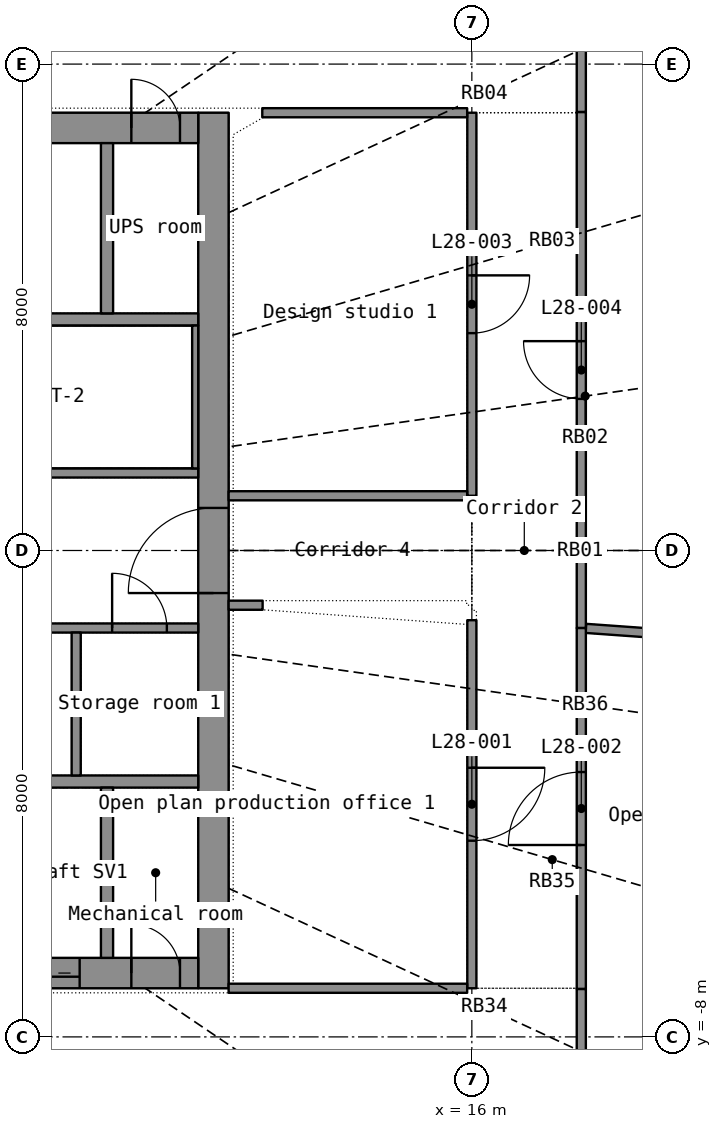
"""IFC4 building model, lengths in metres.
Left out: names, types, materials, properties, quantities, classifications, styles, units other than length and angle.
Written with IfcOpenShell. Run it as: python <this file> out.ifc"""

import sys

from ifc_helpers import new_model, si_unit, direction, frame, frame_2d, origin, place, context, subcontext, project, spatial, rectangle, extrude, element, fill, save


model = new_model("IFC4")
c1 = context("Model", 3, precision=1e-05, world=origin(), true_north=direction((0.0, 1.0)))
c2 = subcontext(c1, "Body", "Model", "MODEL_VIEW")
j1 = project(units=[si_unit("LENGTHUNIT", "METRE"), si_unit("PLANEANGLEUNIT", "RADIAN")], contexts=[c1])
p1 = place(None, origin())
s1 = spatial("IfcSite", under=j1, at=p1, CompositionType="ELEMENT")
p2 = place(p1, origin())
s2 = spatial("IfcBuilding", under=s1, at=p2, CompositionType="ELEMENT")
p3 = place(p2, frame((0.0, 0.0, 119.3)))
s3 = spatial("IfcBuildingStorey", under=s2, at=p3, CompositionType="ELEMENT", Elevation=119.3)
p4 = place(p3, frame((11.75, -7.2, 0.0), z_axis=(0.0, 0.0, 1.0), x_axis=(0.0, 1.0, 0.0)))
e1 = element("IfcWall", 1, at=p4, inside=s3, PredefinedType="SHEAR", context=c2, shape_type="SweptSolid", body=[
    extrude(rectangle(XDim=14.4, YDim=0.5, at=frame_2d((7.2, 0.0))), origin(), (0.0, 0.0, 1.0), 3.3),
])
p5 = place(p4, frame((6.5, 0.0, 0.0)))
e2 = element("IfcOpeningElement", 2, at=p5, cuts=e1, PredefinedType="OPENING", context=c2, shape_type="SweptSolid", body=[
    extrude(rectangle(XDim=1.4, YDim=2.2, at=frame_2d((0.7, 1.1))), frame((0.0, 0.26, 0.0), z_axis=(0.0, -1.0, 0.0), x_axis=(1.0, 0.0, 0.0)), (0.0, 0.0, 1.0), 0.52),
])
p6 = place(p3, frame((-11.5, -6.95, 0.0), z_axis=(0.0, 0.0, 1.0), x_axis=(1.0, 0.0, 0.0)))
e3 = element("IfcWall", 3, at=p6, inside=s3, PredefinedType="SHEAR", context=c2, shape_type="SweptSolid", body=[
    extrude(rectangle(XDim=23.0, YDim=0.5, at=frame_2d((11.5, 0.0))), origin(), (0.0, 0.0, 1.0), 3.3),
])
p7 = place(p6, frame((1.95, 0.0, 0.0)))
e4 = element("IfcOpeningElement", 4, at=p7, cuts=e3, PredefinedType="OPENING", context=c2, shape_type="SweptSolid", body=[
    extrude(rectangle(XDim=1.1, YDim=2.2, at=frame_2d((0.55, 1.1))), frame((0.0, 0.26, 0.0), z_axis=(0.0, -1.0, 0.0), x_axis=(1.0, 0.0, 0.0)), (0.0, 0.0, 1.0), 0.52),
])
p8 = place(p6, frame((3.95, 0.0, 0.0)))
e5 = element("IfcOpeningElement", 5, at=p8, cuts=e3, PredefinedType="OPENING", context=c2, shape_type="SweptSolid", body=[
    extrude(rectangle(XDim=1.1, YDim=2.2, at=frame_2d((0.55, 1.1))), frame((0.0, 0.26, 0.0), z_axis=(0.0, -1.0, 0.0), x_axis=(1.0, 0.0, 0.0)), (0.0, 0.0, 1.0), 0.52),
])
p9 = place(p6, frame((5.95, 0.0, 0.0)))
e6 = element("IfcOpeningElement", 6, at=p9, cuts=e3, PredefinedType="OPENING", context=c2, shape_type="SweptSolid", body=[
    extrude(rectangle(XDim=1.1, YDim=2.2, at=frame_2d((0.55, 1.1))), frame((0.0, 0.26, 0.0), z_axis=(0.0, -1.0, 0.0), x_axis=(1.0, 0.0, 0.0)), (0.0, 0.0, 1.0), 0.52),
])
p10 = place(p6, frame((7.95, 0.0, 0.0)))
e7 = element("IfcOpeningElement", 7, at=p10, cuts=e3, PredefinedType="OPENING", context=c2, shape_type="SweptSolid", body=[
    extrude(rectangle(XDim=1.1, YDim=2.2, at=frame_2d((0.55, 1.1))), frame((0.0, 0.26, 0.0), z_axis=(0.0, -1.0, 0.0), x_axis=(1.0, 0.0, 0.0)), (0.0, 0.0, 1.0), 0.52),
])
p11 = place(p6, frame((9.95, 0.0, 0.0)))
e8 = element("IfcOpeningElement", 8, at=p11, cuts=e3, PredefinedType="OPENING", context=c2, shape_type="SweptSolid", body=[
    extrude(rectangle(XDim=1.1, YDim=2.2, at=frame_2d((0.55, 1.1))), frame((0.0, 0.26, 0.0), z_axis=(0.0, -1.0, 0.0), x_axis=(1.0, 0.0, 0.0)), (0.0, 0.0, 1.0), 0.52),
])
p12 = place(p6, frame((11.95, 0.0, 0.0)))
e9 = element("IfcOpeningElement", 9, at=p12, cuts=e3, PredefinedType="OPENING", context=c2, shape_type="SweptSolid", body=[
    extrude(rectangle(XDim=1.1, YDim=2.2, at=frame_2d((0.55, 1.1))), frame((0.0, 0.26, 0.0), z_axis=(0.0, -1.0, 0.0), x_axis=(1.0, 0.0, 0.0)), (0.0, 0.0, 1.0), 0.52),
])
p13 = place(p6, frame((13.95, 0.0, 0.0)))
e10 = element("IfcOpeningElement", 10, at=p13, cuts=e3, PredefinedType="OPENING", context=c2, shape_type="SweptSolid", body=[
    extrude(rectangle(XDim=1.1, YDim=2.2, at=frame_2d((0.55, 1.1))), frame((0.0, 0.26, 0.0), z_axis=(0.0, -1.0, 0.0), x_axis=(1.0, 0.0, 0.0)), (0.0, 0.0, 1.0), 0.52),
])
p14 = place(p6, frame((15.95, 0.0, 0.0)))
e11 = element("IfcOpeningElement", 11, at=p14, cuts=e3, PredefinedType="OPENING", context=c2, shape_type="SweptSolid", body=[
    extrude(rectangle(XDim=1.1, YDim=2.2, at=frame_2d((0.55, 1.1))), frame((0.0, 0.26, 0.0), z_axis=(0.0, -1.0, 0.0), x_axis=(1.0, 0.0, 0.0)), (0.0, 0.0, 1.0), 0.52),
])
p15 = place(p6, frame((19.95, 0.0, 0.0)))
e12 = element("IfcOpeningElement", 12, at=p15, cuts=e3, PredefinedType="OPENING", context=c2, shape_type="SweptSolid", body=[
    extrude(rectangle(XDim=1.1, YDim=2.2, at=frame_2d((0.55, 1.1))), frame((0.0, 0.26, 0.0), z_axis=(0.0, -1.0, 0.0), x_axis=(1.0, 0.0, 0.0)), (0.0, 0.0, 1.0), 0.52),
])
p16 = place(p6, frame((0.3, 0.0, 0.0)))
e13 = element("IfcOpeningElement", 13, at=p16, cuts=e3, PredefinedType="OPENING", context=c2, shape_type="SweptSolid", body=[
    extrude(rectangle(XDim=0.8, YDim=2.05, at=frame_2d((0.4, 1.025))), frame((0.0, 0.26, 0.0), z_axis=(0.0, -1.0, 0.0), x_axis=(1.0, 0.0, 0.0)), (0.0, 0.0, 1.0), 0.52),
])
p17 = place(p6, frame((21.9, 0.0, 0.0)))
e14 = element("IfcOpeningElement", 14, at=p17, cuts=e3, PredefinedType="OPENING", context=c2, shape_type="SweptSolid", body=[
    extrude(rectangle(XDim=0.8, YDim=2.05, at=frame_2d((0.4, 1.025))), frame((0.0, 0.26, 0.0), z_axis=(0.0, -1.0, 0.0), x_axis=(1.0, 0.0, 0.0)), (0.0, 0.0, 1.0), 0.52),
])
p18 = place(p3, frame((-11.5, 6.95, 0.0), z_axis=(0.0, 0.0, 1.0), x_axis=(1.0, 0.0, 0.0)))
e15 = element("IfcWall", 15, at=p18, inside=s3, PredefinedType="SHEAR", context=c2, shape_type="SweptSolid", body=[
    extrude(rectangle(XDim=23.0, YDim=0.5, at=frame_2d((11.5, 0.0))), origin(), (0.0, 0.0, 1.0), 3.3),
])
p19 = place(p18, frame((1.95, 0.0, 0.0)))
e16 = element("IfcOpeningElement", 16, at=p19, cuts=e15, PredefinedType="OPENING", context=c2, shape_type="SweptSolid", body=[
    extrude(rectangle(XDim=1.1, YDim=2.2, at=frame_2d((0.55, 1.1))), frame((0.0, 0.26, 0.0), z_axis=(0.0, -1.0, 0.0), x_axis=(1.0, 0.0, 0.0)), (0.0, 0.0, 1.0), 0.52),
])
p20 = place(p18, frame((7.05, 0.0, 0.0)))
e17 = element("IfcOpeningElement", 17, at=p20, cuts=e15, PredefinedType="OPENING", context=c2, shape_type="SweptSolid", body=[
    extrude(rectangle(XDim=0.9, YDim=2.1, at=frame_2d((0.45, 1.05))), frame((0.0, 0.26, 0.0), z_axis=(0.0, -1.0, 0.0), x_axis=(1.0, 0.0, 0.0)), (0.0, 0.0, 1.0), 0.52),
])
p21 = place(p18, frame((12.05, 0.0, 0.0)))
e18 = element("IfcOpeningElement", 18, at=p21, cuts=e15, PredefinedType="OPENING", context=c2, shape_type="SweptSolid", body=[
    extrude(rectangle(XDim=0.9, YDim=2.1, at=frame_2d((0.45, 1.05))), frame((0.0, 0.26, 0.0), z_axis=(0.0, -1.0, 0.0), x_axis=(1.0, 0.0, 0.0)), (0.0, 0.0, 1.0), 0.52),
])
p22 = place(p18, frame((18.05, 0.0, 0.0)))
e19 = element("IfcOpeningElement", 19, at=p22, cuts=e15, PredefinedType="OPENING", context=c2, shape_type="SweptSolid", body=[
    extrude(rectangle(XDim=0.9, YDim=2.1, at=frame_2d((0.45, 1.05))), frame((0.0, 0.26, 0.0), z_axis=(0.0, -1.0, 0.0), x_axis=(1.0, 0.0, 0.0)), (0.0, 0.0, 1.0), 0.52),
])
p23 = place(p18, frame((0.3, 0.0, 0.0)))
e20 = element("IfcOpeningElement", 20, at=p23, cuts=e15, PredefinedType="OPENING", context=c2, shape_type="SweptSolid", body=[
    extrude(rectangle(XDim=0.8, YDim=2.05, at=frame_2d((0.4, 1.025))), frame((0.0, 0.26, 0.0), z_axis=(0.0, -1.0, 0.0), x_axis=(1.0, 0.0, 0.0)), (0.0, 0.0, 1.0), 0.52),
])
p24 = place(p18, frame((21.9, 0.0, 0.0)))
e21 = element("IfcOpeningElement", 21, at=p24, cuts=e15, PredefinedType="OPENING", context=c2, shape_type="SweptSolid", body=[
    extrude(rectangle(XDim=0.8, YDim=2.05, at=frame_2d((0.4, 1.025))), frame((0.0, 0.26, 0.0), z_axis=(0.0, -1.0, 0.0), x_axis=(1.0, 0.0, 0.0)), (0.0, 0.0, 1.0), 0.52),
])
for number, where, z_axis, x_axis in (
    (22, (-11.5, -3.8, 0.0), (0.0, 0.0, 1.0), (1.0, 0.0, 0.0)),
    (23, (-11.5, 3.8, 0.0), (0.0, 0.0, 1.0), (1.0, 0.0, 0.0)),
):
    element("IfcWall", number, at=place(p3, frame(where, z_axis=z_axis, x_axis=x_axis)), inside=s3, PredefinedType="SHEAR", context=c2, shape_type="SweptSolid", body=[
        extrude(rectangle(XDim=23.0, YDim=0.2, at=frame_2d((11.5, 0.0))), origin(), (0.0, 0.0, 1.0), 3.3),
    ])
for number, where, z_axis, x_axis in (
    (24, (10.0, -6.7, 0.0), (0.0, 0.0, 1.0), (0.0, 1.0, 0.0)),
    (25, (10.0, 3.9, 0.0), (0.0, 0.0, 1.0), (0.0, 1.0, 0.0)),
):
    element("IfcWall", number, at=place(p3, frame(where, z_axis=z_axis, x_axis=x_axis)), inside=s3, PredefinedType="SHEAR", context=c2, shape_type="SweptSolid", body=[
        extrude(rectangle(XDim=2.8, YDim=0.2, at=frame_2d((1.4, 0.0))), origin(), (0.0, 0.0, 1.0), 3.3),
    ])
p25 = place(p3, frame((3.0, -1.275, 0.0), z_axis=(0.0, 0.0, 1.0), x_axis=(1.0, 0.0, 0.0)))
e26 = element("IfcWall", 26, at=p25, inside=s3, PredefinedType="PARTITIONING", context=c2, shape_type="SweptSolid", body=[
    extrude(rectangle(XDim=8.5, YDim=0.15, at=frame_2d((4.25, 0.0))), origin(), (0.0, 0.0, 1.0), 3.3),
])
p26 = place(p25, frame((0.622, 0.0, 0.0)))
e27 = element("IfcOpeningElement", 27, at=p26, cuts=e26, PredefinedType="OPENING", context=c2, shape_type="SweptSolid", body=[
    extrude(rectangle(XDim=0.85, YDim=2.1, at=frame_2d((0.425, 1.05))), frame((0.0, 0.085, 0.0), z_axis=(0.0, -1.0, 0.0), x_axis=(1.0, 0.0, 0.0)), (0.0, 0.0, 1.0), 0.17),
])
p27 = place(p25, frame((2.865, 0.0, 0.0)))
e28 = element("IfcOpeningElement", 28, at=p27, cuts=e26, PredefinedType="OPENING", context=c2, shape_type="SweptSolid", body=[
    extrude(rectangle(XDim=0.85, YDim=2.1, at=frame_2d((0.425, 1.05))), frame((0.0, 0.085, 0.0), z_axis=(0.0, -1.0, 0.0), x_axis=(1.0, 0.0, 0.0)), (0.0, 0.0, 1.0), 0.17),
])
p28 = place(p25, frame((5.002, 0.0, 0.0)))
e29 = element("IfcOpeningElement", 29, at=p28, cuts=e26, PredefinedType="OPENING", context=c2, shape_type="SweptSolid", body=[
    extrude(rectangle(XDim=0.9, YDim=2.1, at=frame_2d((0.45, 1.05))), frame((0.0, 0.085, 0.0), z_axis=(0.0, -1.0, 0.0), x_axis=(1.0, 0.0, 0.0)), (0.0, 0.0, 1.0), 0.17),
])
p29 = place(p25, frame((7.084, 0.0, 0.0)))
e30 = element("IfcOpeningElement", 30, at=p29, cuts=e26, PredefinedType="OPENING", context=c2, shape_type="SweptSolid", body=[
    extrude(rectangle(XDim=0.9, YDim=2.1, at=frame_2d((0.45, 1.05))), frame((0.0, 0.085, 0.0), z_axis=(0.0, -1.0, 0.0), x_axis=(1.0, 0.0, 0.0)), (0.0, 0.0, 1.0), 0.17),
])
p30 = place(p3, frame((3.0, 1.275, 0.0), z_axis=(0.0, 0.0, 1.0), x_axis=(1.0, 0.0, 0.0)))
e31 = element("IfcWall", 31, at=p30, inside=s3, PredefinedType="SHEAR", context=c2, shape_type="SweptSolid", body=[
    extrude(rectangle(XDim=8.5, YDim=0.15, at=frame_2d((4.25, 0.0))), origin(), (0.0, 0.0, 1.0), 3.3),
])
p31 = place(p30, frame((2.05, 0.0, 0.0)))
e32 = element("IfcOpeningElement", 32, at=p31, cuts=e31, PredefinedType="OPENING", context=c2, shape_type="SweptSolid", body=[
    extrude(rectangle(XDim=1.1, YDim=2.15, at=frame_2d((0.55, 1.075))), frame((0.0, 0.085, 0.0), z_axis=(0.0, -1.0, 0.0), x_axis=(1.0, 0.0, 0.0)), (0.0, 0.0, 1.0), 0.17),
])
p32 = place(p30, frame((0.45, 0.0, 0.0)))
e33 = element("IfcOpeningElement", 33, at=p32, cuts=e31, PredefinedType="OPENING", context=c2, shape_type="SweptSolid", body=[
    extrude(rectangle(XDim=0.9, YDim=2.1, at=frame_2d((0.45, 1.05))), frame((0.0, 0.085, 0.0), z_axis=(0.0, -1.0, 0.0), x_axis=(1.0, 0.0, 0.0)), (0.0, 0.0, 1.0), 0.17),
])
p33 = place(p3, frame((11.45, 1.35, 0.0), z_axis=(0.0, 0.0, 1.0), x_axis=(0.0, 1.0, 0.0)))
e34 = element("IfcWall", 34, at=p33, inside=s3, PredefinedType="SHEAR", context=c2, shape_type="SweptSolid", body=[
    extrude(rectangle(XDim=2.35, YDim=0.1, at=frame_2d((1.175, 0.0))), origin(), (0.0, 0.0, 1.0), 3.3),
])
p34 = place(p3, frame((9.493, -3.7, 0.0), z_axis=(0.0, 0.0, 1.0), x_axis=(0.0, 1.0, 0.0)))
e35 = element("IfcWall", 35, at=p34, inside=s3, PredefinedType="PARTITIONING", context=c2, shape_type="SweptSolid", body=[
    extrude(rectangle(XDim=2.35, YDim=0.15, at=frame_2d((1.175, 0.0))), origin(), (0.0, 0.0, 1.0), 3.3),
])
p35 = place(p3, frame((17.8, -1.276, 0.0), z_axis=(0.0, 0.0, 1.0), x_axis=(0.0, 1.0, 0.0)))
e36 = element("IfcWall", 36, at=p35, inside=s3, PredefinedType="PARTITIONING", context=c2, shape_type="SweptSolid", body=[
    extrude(rectangle(XDim=8.488, YDim=0.15, at=frame_2d((4.244, 0.0))), origin(), (0.0, 0.0, 1.0), 2.4),
])
p36 = place(p35, frame((3.769, 0.0, 0.0)))
e37 = element("IfcOpeningElement", 37, at=p36, cuts=e36, PredefinedType="OPENING", context=c2, shape_type="SweptSolid", body=[
    extrude(rectangle(XDim=0.95, YDim=2.15, at=frame_2d((0.475, 1.075))), frame((0.0, 0.085, 0.0), z_axis=(0.0, -1.0, 0.0), x_axis=(1.0, 0.0, 0.0)), (0.0, 0.0, 1.0), 0.17),
])
p37 = place(p3, frame((25.006, -1.792, 0.0), z_axis=(0.0, 0.0, 1.0), x_axis=(-0.997440983, 0.071494657, 0.0)))
e38 = element("IfcWall", 38, at=p37, inside=s3, PredefinedType="PARTITIONING", context=c2, shape_type="SweptSolid", body=[
    extrude(rectangle(XDim=7.147, YDim=0.15, at=frame_2d((3.574, 0.0))), origin(), (0.0, 0.0, 1.0), 2.4),
])
p38 = place(p3, frame((16.0, 7.2, 0.0), z_axis=(0.0, 0.0, 1.0), x_axis=(0.0, -1.0, 0.0)))
e39 = element("IfcWall", 39, at=p38, inside=s3, PredefinedType="PARTITIONING", context=c2, shape_type="SweptSolid", body=[
    extrude(rectangle(XDim=6.3, YDim=0.15, at=frame_2d((3.15, 0.0))), origin(), (0.0, 0.0, 1.0), 2.4),
])
p39 = place(p38, frame((2.675, 0.0, 0.0)))
e40 = element("IfcOpeningElement", 40, at=p39, cuts=e39, PredefinedType="OPENING", context=c2, shape_type="SweptSolid", body=[
    extrude(rectangle(XDim=0.95, YDim=2.15, at=frame_2d((0.475, 1.075))), frame((0.0, 0.085, 0.0), z_axis=(0.0, -1.0, 0.0), x_axis=(1.0, 0.0, 0.0)), (0.0, 0.0, 1.0), 0.17),
])
p40 = place(p3, frame((16.0, -1.146, 0.0), z_axis=(0.0, 0.0, 1.0), x_axis=(0.0, -1.0, 0.0)))
e41 = element("IfcWall", 41, at=p40, inside=s3, PredefinedType="PARTITIONING", context=c2, shape_type="SweptSolid", body=[
    extrude(rectangle(XDim=6.053, YDim=0.15, at=frame_2d((3.027, 0.0))), origin(), (0.0, 0.0, 1.0), 2.4),
])
p41 = place(p40, frame((2.427, 0.0, 0.0)))
e42 = element("IfcOpeningElement", 42, at=p41, cuts=e41, PredefinedType="OPENING", context=c2, shape_type="SweptSolid", body=[
    extrude(rectangle(XDim=1.2, YDim=2.2, at=frame_2d((0.6, 1.1))), frame((0.0, 0.085, 0.0), z_axis=(0.0, -1.0, 0.0), x_axis=(1.0, 0.0, 0.0)), (0.0, 0.0, 1.0), 0.17),
])
p42 = place(p3, frame((17.8, -7.212, 0.0), z_axis=(0.0, 0.0, 1.0), x_axis=(0.0, 1.0, 0.0)))
e43 = element("IfcWall", 43, at=p42, inside=s3, PredefinedType="PARTITIONING", context=c2, shape_type="SweptSolid", body=[
    extrude(rectangle(XDim=5.936, YDim=0.15, at=frame_2d((2.968, 0.0))), origin(), (0.0, 0.0, 1.0), 2.4),
])
p43 = place(p42, frame((2.368, 0.0, 0.0)))
e44 = element("IfcOpeningElement", 44, at=p43, cuts=e43, PredefinedType="OPENING", context=c2, shape_type="SweptSolid", body=[
    extrude(rectangle(XDim=1.2, YDim=2.2, at=frame_2d((0.6, 1.1))), frame((0.0, 0.085, 0.0), z_axis=(0.0, -1.0, 0.0), x_axis=(1.0, 0.0, 0.0)), (0.0, 0.0, 1.0), 0.17),
])
for number, where, z_axis, x_axis in (
    (45, (15.923, -7.2, 0.0), (0.0, 0.0, 1.0), (-1.0, 0.0, 0.0)),
    (46, (15.923, 0.9, 0.0), (0.0, 0.0, 1.0), (-1.0, 0.0, 0.0)),
):
    element("IfcWall", number, at=place(p3, frame(where, z_axis=z_axis, x_axis=x_axis)), inside=s3, PredefinedType="PARTITIONING", context=c2, shape_type="SweptSolid", body=[
        extrude(rectangle(XDim=3.923, YDim=0.15, at=frame_2d((1.961, 0.0))), origin(), (0.0, 0.0, 1.0), 2.4),
    ])
p44 = place(p3, frame((17.8, -10.723, 0.0), z_axis=(0.0, 0.0, 1.0), x_axis=(0.0, 1.0, 0.0)))
e47 = element("IfcWall", 47, at=p44, inside=s3, PredefinedType="PARTITIONING", context=c2, shape_type="SweptSolid", body=[
    extrude(rectangle(XDim=3.51, YDim=0.15, at=frame_2d((1.755, 0.0))), origin(), (0.0, 0.0, 1.0), 2.4),
])
p45 = place(p3, frame((12.553, 7.2, 0.0), z_axis=(0.0, 0.0, 1.0), x_axis=(1.0, 0.0, 0.0)))
e48 = element("IfcWall", 48, at=p45, inside=s3, PredefinedType="PARTITIONING", context=c2, shape_type="SweptSolid", body=[
    extrude(rectangle(XDim=3.37, YDim=0.15, at=frame_2d((1.685, 0.0))), origin(), (0.0, 0.0, 1.0), 2.4),
])
p46 = place(p3, frame((17.8, 7.213, 0.0), z_axis=(0.0, 0.0, 1.0), x_axis=(0.0, 1.0, 0.0)))
e49 = element("IfcWall", 49, at=p46, inside=s3, PredefinedType="PARTITIONING", context=c2, shape_type="SweptSolid", body=[
    extrude(rectangle(XDim=2.387, YDim=0.15, at=frame_2d((1.194, 0.0))), origin(), (0.0, 0.0, 1.0), 2.4),
])
p47 = place(p3, frame((12.0, -0.9, 0.0), z_axis=(0.0, 0.0, 1.0), x_axis=(1.0, 0.0, 0.0)))
e50 = element("IfcWall", 50, at=p47, inside=s3, PredefinedType="PARTITIONING", context=c2, shape_type="SweptSolid", body=[
    extrude(rectangle(XDim=0.559, YDim=0.15, at=frame_2d((0.28, 0.0))), origin(), (0.0, 0.0, 1.0), 2.4),
])
p48 = place(p15, origin())
e51 = element("IfcDoor", 51, at=p48, inside=s3, OperationType="DOUBLE_DOOR_SLIDING", PredefinedType="DOOR", context=c2, shape_type="SweptSolid", body=[
    extrude(rectangle(XDim=1.1, YDim=2.2, at=frame_2d((0.55, 1.1))), frame((0.0, 0.025, 0.0), z_axis=(0.0, -1.0, 0.0), x_axis=(1.0, 0.0, 0.0)), (0.0, 0.0, 1.0), 0.05),
])
fill(e12, e51)
p49 = place(p17, origin())
e52 = element("IfcDoor", 52, at=p49, inside=s3, OperationType="SINGLE_SWING_LEFT", PredefinedType="DOOR", context=c2, shape_type="SweptSolid", body=[
    extrude(rectangle(XDim=0.8, YDim=2.05, at=frame_2d((0.4, 1.025))), frame((0.0, 0.025, 0.0), z_axis=(0.0, -1.0, 0.0), x_axis=(1.0, 0.0, 0.0)), (0.0, 0.0, 1.0), 0.05),
])
fill(e14, e52)
p50 = place(p24, origin())
e53 = element("IfcDoor", 53, at=p50, inside=s3, OperationType="SINGLE_SWING_LEFT", PredefinedType="DOOR", context=c2, shape_type="SweptSolid", body=[
    extrude(rectangle(XDim=0.8, YDim=2.05, at=frame_2d((0.4, 1.025))), frame((0.0, 0.025, 0.0), z_axis=(0.0, -1.0, 0.0), x_axis=(1.0, 0.0, 0.0)), (0.0, 0.0, 1.0), 0.05),
])
fill(e21, e53)
p51 = place(p5, origin())
e54 = element("IfcDoor", 54, at=p51, inside=s3, OperationType="DOUBLE_DOOR_SINGLE_SWING", PredefinedType="DOOR", context=c2, shape_type="SweptSolid", body=[
    extrude(rectangle(XDim=1.4, YDim=2.2, at=frame_2d((0.7, 1.1))), frame((0.0, 0.025, 0.0), z_axis=(0.0, -1.0, 0.0), x_axis=(1.0, 0.0, 0.0)), (0.0, 0.0, 1.0), 0.05),
])
fill(e2, e54)
p52 = place(p29, origin())
e55 = element("IfcDoor", 55, at=p52, inside=s3, OperationType="SINGLE_SWING_LEFT", PredefinedType="DOOR", context=c2, shape_type="SweptSolid", body=[
    extrude(rectangle(XDim=0.9, YDim=2.1, at=frame_2d((0.45, 1.05))), frame((0.0, 0.025, 0.0), z_axis=(0.0, -1.0, 0.0), x_axis=(1.0, 0.0, 0.0)), (0.0, 0.0, 1.0), 0.05),
])
fill(e30, e55)
p53 = place(p41, origin())
e56 = element("IfcDoor", 56, at=p53, inside=s3, OperationType="DOUBLE_DOOR_SINGLE_SWING", PredefinedType="DOOR", context=c2, shape_type="SweptSolid", body=[
    extrude(rectangle(XDim=1.2, YDim=2.2, at=frame_2d((0.6, 1.1))), frame((0.0, 0.025, 0.0), z_axis=(0.0, -1.0, 0.0), x_axis=(1.0, 0.0, 0.0)), (0.0, 0.0, 1.0), 0.05),
])
fill(e42, e56)
p54 = place(p43, origin())
e57 = element("IfcDoor", 57, at=p54, inside=s3, OperationType="DOUBLE_DOOR_SINGLE_SWING", PredefinedType="DOOR", context=c2, shape_type="SweptSolid", body=[
    extrude(rectangle(XDim=1.2, YDim=2.2, at=frame_2d((0.6, 1.1))), frame((0.0, 0.025, 0.0), z_axis=(0.0, -1.0, 0.0), x_axis=(1.0, 0.0, 0.0)), (0.0, 0.0, 1.0), 0.05),
])
fill(e44, e57)
p55 = place(p39, origin())
e58 = element("IfcDoor", 58, at=p55, inside=s3, OperationType="SINGLE_SWING_LEFT", PredefinedType="DOOR", context=c2, shape_type="SweptSolid", body=[
    extrude(rectangle(XDim=0.95, YDim=2.15, at=frame_2d((0.475, 1.075))), frame((0.0, 0.025, 0.0), z_axis=(0.0, -1.0, 0.0), x_axis=(1.0, 0.0, 0.0)), (0.0, 0.0, 1.0), 0.05),
])
fill(e40, e58)
p56 = place(p36, origin())
e59 = element("IfcDoor", 59, at=p56, inside=s3, OperationType="SINGLE_SWING_RIGHT", PredefinedType="DOOR", context=c2, shape_type="SweptSolid", body=[
    extrude(rectangle(XDim=0.95, YDim=2.15, at=frame_2d((0.475, 1.075))), frame((0.0, 0.025, 0.0), z_axis=(0.0, -1.0, 0.0), x_axis=(1.0, 0.0, 0.0)), (0.0, 0.0, 1.0), 0.05),
])
fill(e37, e59)
save(model, sys.argv[1])
